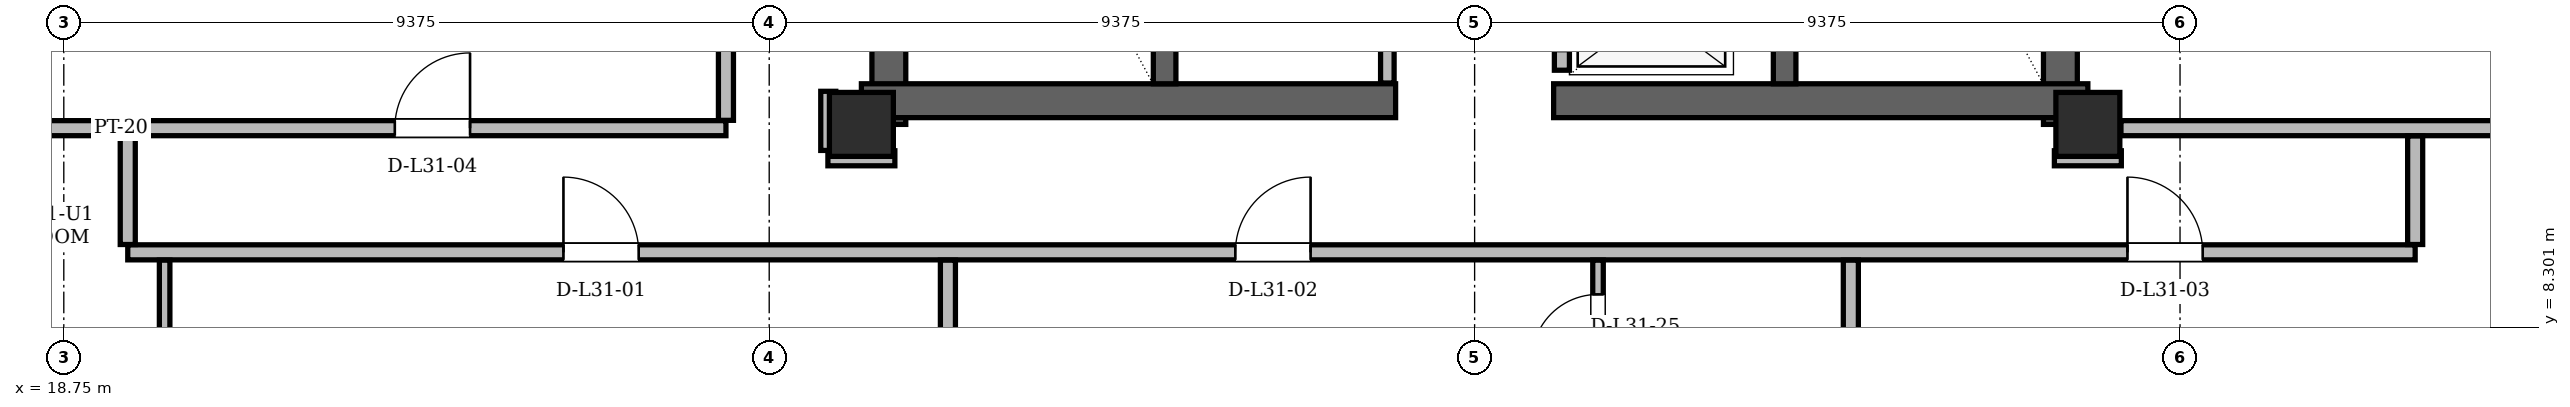
"""IFC4 building model, lengths in metres.
Left out: names, types, materials, properties, quantities, classifications, styles, units other than length and angle.
Written with IfcOpenShell. Run it as: python <this file> out.ifc"""

import sys

from ifc_helpers import new_model, si_unit, direction, frame, frame_2d, origin, origin_2d, place, context, subcontext, project, spatial, rectangle, hollow_rectangle, extrude, element, fill, save


model = new_model("IFC4")
c1 = context("Model", 3, precision=1e-05, world=origin(), true_north=direction((0.0, 1.0)))
c2 = subcontext(c1, "Body", "Model", "MODEL_VIEW")
j1 = project(units=[si_unit("LENGTHUNIT", "METRE"), si_unit("PLANEANGLEUNIT", "RADIAN")], contexts=[c1])
p1 = place(None, origin())
s1 = spatial("IfcSite", under=j1, at=p1, CompositionType="ELEMENT")
p2 = place(p1, origin())
s2 = spatial("IfcBuilding", under=s1, at=p2, CompositionType="ELEMENT")
p3 = place(p2, frame((0.0, 0.0, 119.4)))
s3 = spatial("IfcBuildingStorey", under=s2, at=p3, CompositionType="ELEMENT", Elevation=119.4)
for number, where, z_axis, x_axis in (
    (1, (29.35, 11.0, 0.0), (0.0, 0.0, 1.0), (1.0, 0.0, 0.0)),
    (2, (45.65, 11.0, 0.0), (0.0, 0.0, 1.0), (1.0, 0.0, 0.0)),
):
    element("IfcColumn", number, at=place(p3, frame(where, z_axis=z_axis, x_axis=x_axis)), inside=s3, PredefinedType="COLUMN", context=c2, shape_type="SweptSolid", body=[
        extrude(hollow_rectangle(XDim=0.85, YDim=0.85, WallThickness=0.07, at=origin_2d()), origin(), (0.0, 0.0, 1.0), 3.6),
    ])
for number, where, z_axis, x_axis in (
    (3, (29.715, 11.0, 0.0), (0.0, 0.0, 1.0), (0.0, 1.0, 0.0)),
    (4, (45.285, 11.0, 0.0), (0.0, 0.0, 1.0), (0.0, 1.0, 0.0)),
):
    element("IfcWall", number, at=place(p3, frame(where, z_axis=z_axis, x_axis=x_axis)), inside=s3, PredefinedType="SHEAR", context=c2, shape_type="SweptSolid", body=[
        extrude(rectangle(XDim=13.3, YDim=0.45, at=frame_2d((6.65, 0.0))), origin(), (0.0, 0.0, 1.0), 3.36),
    ])
for number, where, z_axis, x_axis in (
    (5, (29.35, 11.315, 0.0), (0.0, 0.0, 1.0), (1.0, 0.0, 0.0)),
    (6, (38.55, 11.315, 0.0), (0.0, 0.0, 1.0), (1.0, 0.0, 0.0)),
):
    element("IfcWall", number, at=place(p3, frame(where, z_axis=z_axis, x_axis=x_axis)), inside=s3, PredefinedType="SHEAR", context=c2, shape_type="SweptSolid", body=[
        extrude(rectangle(XDim=7.1, YDim=0.45, at=frame_2d((3.55, 0.0))), origin(), (0.0, 0.0, 1.0), 3.36),
    ])
for number, where, z_axis, x_axis in (
    (7, (33.38, 11.54, 0.0), (0.0, 0.0, 1.0), (0.0, 1.0, 0.0)),
    (8, (41.62, 11.54, 0.0), (0.0, 0.0, 1.0), (0.0, 1.0, 0.0)),
):
    element("IfcWall", number, at=place(p3, frame(where, z_axis=z_axis, x_axis=x_axis)), inside=s3, PredefinedType="SHEAR", context=c2, shape_type="SweptSolid", body=[
        extrude(rectangle(XDim=7.62, YDim=0.3, at=frame_2d((3.81, 0.0))), origin(), (0.0, 0.0, 1.0), 3.36),
    ])
p4 = place(p3, frame((14.583, 13.181, 0.0), z_axis=(0.0, 0.0, 1.0), x_axis=(0.49998922304, -0.866031625776, 0.0)))
e9 = element("IfcWall", 9, at=p4, inside=s3, PredefinedType="SOLIDWALL", context=c2, shape_type="SweptSolid", body=[
    extrude(rectangle(XDim=10.932, YDim=0.34, at=frame_2d((5.466, 0.0))), origin(), (0.0, 0.0, 1.0), 2.578),
])
p5 = place(p3, frame((36.34, 11.55, 0.0), z_axis=(0.0, 0.0, 1.0), x_axis=(0.0, 1.0, 0.0)))
e10 = element("IfcWall", 10, at=p5, inside=s3, PredefinedType="PARTITIONING", context=c2, shape_type="SweptSolid", body=[
    extrude(rectangle(XDim=5.55, YDim=0.18, at=frame_2d((2.775, 0.0))), origin(), (0.0, 0.0, 1.0), 3.36),
])
p6 = place(p5, frame((2.85, 0.0, 0.0)))
e11 = element("IfcOpeningElement", 11, at=p6, cuts=e10, PredefinedType="OPENING", context=c2, shape_type="SweptSolid", body=[
    extrude(rectangle(XDim=0.95, YDim=2.1, at=frame_2d((0.475, 1.05))), frame((0.0, 0.09, 0.0), z_axis=(0.0, -1.0, 0.0), x_axis=(1.0, 0.0, 0.0)), (0.0, 0.0, 1.0), 0.18),
])
p7 = place(p3, frame((38.66, 11.72, 0.0), z_axis=(0.0, 0.0, 1.0), x_axis=(0.0, 1.0, 0.0)))
e12 = element("IfcWall", 12, at=p7, inside=s3, PredefinedType="PARTITIONING", context=c2, shape_type="SweptSolid", body=[
    extrude(rectangle(XDim=9.1, YDim=0.2, at=frame_2d((4.55, 0.0))), origin(), (0.0, 0.0, 1.0), 3.36),
])
p8 = place(p7, frame((0.255, 0.0, 0.0)))
e13 = element("IfcOpeningElement", 13, at=p8, cuts=e12, PredefinedType="OPENING", context=c2, shape_type="SweptSolid", body=[
    extrude(rectangle(XDim=1.05, YDim=2.15, at=frame_2d((0.525, 1.075))), frame((0.0, 0.1, 0.0), z_axis=(0.0, -1.0, 0.0), x_axis=(1.0, 0.0, 0.0)), (0.0, 0.0, 1.0), 0.2),
])
p9 = place(p7, frame((2.105, 0.0, 0.0)))
e14 = element("IfcOpeningElement", 14, at=p9, cuts=e12, PredefinedType="OPENING", context=c2, shape_type="SweptSolid", body=[
    extrude(rectangle(XDim=1.05, YDim=2.15, at=frame_2d((0.525, 1.075))), frame((0.0, 0.1, 0.0), z_axis=(0.0, -1.0, 0.0), x_axis=(1.0, 0.0, 0.0)), (0.0, 0.0, 1.0), 0.2),
])
p10 = place(p7, frame((3.955, 0.0, 0.0)))
e15 = element("IfcOpeningElement", 15, at=p10, cuts=e12, PredefinedType="OPENING", context=c2, shape_type="SweptSolid", body=[
    extrude(rectangle(XDim=1.05, YDim=2.15, at=frame_2d((0.525, 1.075))), frame((0.0, 0.1, 0.0), z_axis=(0.0, -1.0, 0.0), x_axis=(1.0, 0.0, 0.0)), (0.0, 0.0, 1.0), 0.2),
])
p11 = place(p3, frame((19.6, 9.3, 0.0), z_axis=(0.0, 0.0, 1.0), x_axis=(1.0, 0.0, 0.0)))
e16 = element("IfcWall", 16, at=p11, inside=s3, PredefinedType="PARTITIONING", context=c2, shape_type="SweptSolid", body=[
    extrude(rectangle(XDim=30.4, YDim=0.2, at=frame_2d((15.2, 0.0))), origin(), (0.0, 0.0, 1.0), 2.814),
])
p12 = place(p11, frame((5.79, 0.0, 0.0)))
e17 = element("IfcOpeningElement", 17, at=p12, cuts=e16, PredefinedType="OPENING", context=c2, shape_type="SweptSolid", body=[
    extrude(rectangle(XDim=1.0, YDim=2.18, at=frame_2d((0.5, 1.09))), frame((0.0, 0.1, 0.0), z_axis=(0.0, -1.0, 0.0), x_axis=(1.0, 0.0, 0.0)), (0.0, 0.0, 1.0), 0.2),
])
p13 = place(p11, frame((14.72, 0.0, 0.0)))
e18 = element("IfcOpeningElement", 18, at=p13, cuts=e16, PredefinedType="OPENING", context=c2, shape_type="SweptSolid", body=[
    extrude(rectangle(XDim=1.0, YDim=2.18, at=frame_2d((0.5, 1.09))), frame((0.0, 0.1, 0.0), z_axis=(0.0, -1.0, 0.0), x_axis=(1.0, 0.0, 0.0)), (0.0, 0.0, 1.0), 0.2),
])
p14 = place(p11, frame((26.576, 0.0, 0.0)))
e19 = element("IfcOpeningElement", 19, at=p14, cuts=e16, PredefinedType="OPENING", context=c2, shape_type="SweptSolid", body=[
    extrude(rectangle(XDim=1.0, YDim=2.18, at=frame_2d((0.5, 1.09))), frame((0.0, 0.1, 0.0), z_axis=(0.0, -1.0, 0.0), x_axis=(1.0, 0.0, 0.0)), (0.0, 0.0, 1.0), 0.2),
])
for number, where, z_axis, x_axis in (
    (20, (28.905, 10.55, 0.0), (0.0, 0.0, 1.0), (1.0, 0.0, 0.0)),
    (21, (45.205, 10.55, 0.0), (0.0, 0.0, 1.0), (1.0, 0.0, 0.0)),
):
    element("IfcWall", number, at=place(p3, frame(where, z_axis=z_axis, x_axis=x_axis)), inside=s3, PredefinedType="PARTITIONING", context=c2, shape_type="SweptSolid", body=[
        extrude(rectangle(XDim=0.89, YDim=0.2, at=frame_2d((0.445, 0.0))), origin(), (0.0, 0.0, 1.0), 3.36),
    ])
p15 = place(p3, frame((16.072, 10.95, 0.0), z_axis=(0.0, 0.0, 1.0), x_axis=(1.0, 0.0, 0.0)))
e22 = element("IfcWall", 22, at=p15, inside=s3, PredefinedType="PARTITIONING", context=c2, shape_type="SweptSolid", body=[
    extrude(rectangle(XDim=11.478, YDim=0.2, at=frame_2d((5.739, 0.0))), origin(), (0.0, 0.0, 1.0), 3.36),
])
p16 = place(p15, frame((7.077, 0.0, 0.0)))
e23 = element("IfcOpeningElement", 23, at=p16, cuts=e22, PredefinedType="OPENING", context=c2, shape_type="SweptSolid", body=[
    extrude(rectangle(XDim=1.0, YDim=2.18, at=frame_2d((0.5, 1.09))), frame((0.0, 0.1, 0.0), z_axis=(0.0, -1.0, 0.0), x_axis=(1.0, 0.0, 0.0)), (0.0, 0.0, 1.0), 0.2),
])
p17 = place(p3, frame((46.09, 10.95, 0.0), z_axis=(0.0, 0.0, 1.0), x_axis=(1.0, 0.0, 0.0)))
e24 = element("IfcWall", 24, at=p17, inside=s3, PredefinedType="PARTITIONING", context=c2, shape_type="SweptSolid", body=[
    extrude(rectangle(XDim=12.838, YDim=0.2, at=frame_2d((6.419, 0.0))), origin(), (0.0, 0.0, 1.0), 2.814),
])
p18 = place(p3, frame((19.6, 9.404, 0.0), z_axis=(0.0, 0.0, 1.0), x_axis=(0.0, 1.0, 0.0)))
e25 = element("IfcWall", 25, at=p18, inside=s3, PredefinedType="PARTITIONING", context=c2, shape_type="SweptSolid", body=[
    extrude(rectangle(XDim=1.442, YDim=0.2, at=frame_2d((0.721, 0.0))), origin(), (0.0, 0.0, 1.0), 3.36),
])
p19 = place(p3, frame((20.09, 4.12, 0.0), z_axis=(0.0, 0.0, 1.0), x_axis=(0.0, 1.0, 0.0)))
e26 = element("IfcWall", 26, at=p19, inside=s3, PredefinedType="PARTITIONING", context=c2, shape_type="SweptSolid", body=[
    extrude(rectangle(XDim=5.076, YDim=0.14, at=frame_2d((2.538, 0.0))), origin(), (0.0, 0.0, 1.0), 3.36),
])
p20 = place(p19, frame((2.057, 0.0, 0.0)))
e27 = element("IfcOpeningElement", 27, at=p20, cuts=e26, PredefinedType="OPENING", context=c2, shape_type="SweptSolid", body=[
    extrude(rectangle(XDim=0.88, YDim=2.08, at=frame_2d((0.44, 1.04))), frame((0.0, 0.07, 0.0), z_axis=(0.0, -1.0, 0.0), x_axis=(1.0, 0.0, 0.0)), (0.0, 0.0, 1.0), 0.14),
])
p21 = place(p3, frame((27.55, 11.054, 0.0), z_axis=(0.0, 0.0, 1.0), x_axis=(0.0, 1.0, 0.0)))
e28 = element("IfcWall", 28, at=p21, inside=s3, PredefinedType="PARTITIONING", context=c2, shape_type="SweptSolid", body=[
    extrude(rectangle(XDim=5.692, YDim=0.2, at=frame_2d((2.846, 0.0))), origin(), (0.0, 0.0, 1.0), 2.814),
])
p22 = place(p3, frame((28.91, 10.654, 0.0), z_axis=(0.0, 0.0, 1.0), x_axis=(0.0, 1.0, 0.0)))
e29 = element("IfcWall", 29, at=p22, inside=s3, PredefinedType="PARTITIONING", context=c2, shape_type="SweptSolid", body=[
    extrude(rectangle(XDim=0.786, YDim=0.2, at=frame_2d((0.393, 0.0))), origin(), (0.0, 0.0, 1.0), 2.814),
])
p23 = place(p3, frame((30.5, 3.972, 0.0), z_axis=(0.0, 0.0, 1.0), x_axis=(0.0, 1.0, 0.0)))
e30 = element("IfcWall", 30, at=p23, inside=s3, PredefinedType="PARTITIONING", context=c2, shape_type="SweptSolid", body=[
    extrude(rectangle(XDim=5.224, YDim=0.2, at=frame_2d((2.612, 0.0))), origin(), (0.0, 0.0, 1.0), 3.36),
])
p24 = place(p3, frame((39.14, 3.887, 0.0), z_axis=(0.0, 0.0, 1.0), x_axis=(0.0, 1.0, 0.0)))
e31 = element("IfcWall", 31, at=p24, inside=s3, PredefinedType="PARTITIONING", context=c2, shape_type="SweptSolid", body=[
    extrude(rectangle(XDim=5.309, YDim=0.14, at=frame_2d((2.655, 0.0))), origin(), (0.0, 0.0, 1.0), 3.36),
])
p25 = place(p24, frame((1.19, 0.0, 0.0)))
e32 = element("IfcOpeningElement", 32, at=p25, cuts=e31, PredefinedType="OPENING", context=c2, shape_type="SweptSolid", body=[
    extrude(rectangle(XDim=0.95, YDim=2.1, at=frame_2d((0.475, 1.05))), frame((0.0, 0.07, 0.0), z_axis=(0.0, -1.0, 0.0), x_axis=(1.0, 0.0, 0.0)), (0.0, 0.0, 1.0), 0.14),
])
p26 = place(p24, frame((3.974, 0.0, 0.0)))
e33 = element("IfcOpeningElement", 33, at=p26, cuts=e31, PredefinedType="OPENING", context=c2, shape_type="SweptSolid", body=[
    extrude(rectangle(XDim=0.88, YDim=2.08, at=frame_2d((0.44, 1.04))), frame((0.0, 0.07, 0.0), z_axis=(0.0, -1.0, 0.0), x_axis=(1.0, 0.0, 0.0)), (0.0, 0.0, 1.0), 0.14),
])
p27 = place(p3, frame((42.5, 3.887, 0.0), z_axis=(0.0, 0.0, 1.0), x_axis=(0.0, 1.0, 0.0)))
e34 = element("IfcWall", 34, at=p27, inside=s3, PredefinedType="PARTITIONING", context=c2, shape_type="SweptSolid", body=[
    extrude(rectangle(XDim=5.309, YDim=0.2, at=frame_2d((2.655, 0.0))), origin(), (0.0, 0.0, 1.0), 2.946),
])
p28 = place(p3, frame((50.0, 9.404, 0.0), z_axis=(0.0, 0.0, 1.0), x_axis=(0.0, 1.0, 0.0)))
e35 = element("IfcWall", 35, at=p28, inside=s3, PredefinedType="PARTITIONING", context=c2, shape_type="SweptSolid", body=[
    extrude(rectangle(XDim=1.442, YDim=0.2, at=frame_2d((0.721, 0.0))), origin(), (0.0, 0.0, 1.0), 3.36),
])
p29 = place(p12, origin())
e36 = element("IfcDoor", 36, at=p29, inside=s3, OperationType="SINGLE_SWING_LEFT", PredefinedType="DOOR", context=c2, shape_type="SweptSolid", body=[
    extrude(rectangle(XDim=1.0, YDim=2.18, at=frame_2d((0.5, 1.09))), frame((0.0, 0.025, 0.0), z_axis=(0.0, -1.0, 0.0), x_axis=(1.0, 0.0, 0.0)), (0.0, 0.0, 1.0), 0.05),
])
fill(e17, e36)
p30 = place(p13, origin())
e37 = element("IfcDoor", 37, at=p30, inside=s3, OperationType="SINGLE_SWING_RIGHT", PredefinedType="DOOR", context=c2, shape_type="SweptSolid", body=[
    extrude(rectangle(XDim=1.0, YDim=2.18, at=frame_2d((0.5, 1.09))), frame((0.0, 0.025, 0.0), z_axis=(0.0, -1.0, 0.0), x_axis=(1.0, 0.0, 0.0)), (0.0, 0.0, 1.0), 0.05),
])
fill(e18, e37)
p31 = place(p14, origin())
e38 = element("IfcDoor", 38, at=p31, inside=s3, OperationType="SINGLE_SWING_LEFT", PredefinedType="DOOR", context=c2, shape_type="SweptSolid", body=[
    extrude(rectangle(XDim=1.0, YDim=2.18, at=frame_2d((0.5, 1.09))), frame((0.0, 0.025, 0.0), z_axis=(0.0, -1.0, 0.0), x_axis=(1.0, 0.0, 0.0)), (0.0, 0.0, 1.0), 0.05),
])
fill(e19, e38)
p32 = place(p16, origin())
e39 = element("IfcDoor", 39, at=p32, inside=s3, OperationType="SINGLE_SWING_RIGHT", PredefinedType="DOOR", context=c2, shape_type="SweptSolid", body=[
    extrude(rectangle(XDim=1.0, YDim=2.18, at=frame_2d((0.5, 1.09))), frame((0.0, 0.025, 0.0), z_axis=(0.0, -1.0, 0.0), x_axis=(1.0, 0.0, 0.0)), (0.0, 0.0, 1.0), 0.05),
])
fill(e23, e39)
p33 = place(p26, origin())
e40 = element("IfcDoor", 40, at=p33, inside=s3, OperationType="SINGLE_SWING_LEFT", PredefinedType="DOOR", context=c2, shape_type="SweptSolid", body=[
    extrude(rectangle(XDim=0.88, YDim=2.08, at=frame_2d((0.44, 1.04))), frame((0.0, 0.025, 0.0), z_axis=(0.0, -1.0, 0.0), x_axis=(1.0, 0.0, 0.0)), (0.0, 0.0, 1.0), 0.05),
])
fill(e33, e40)
save(model, sys.argv[1])
